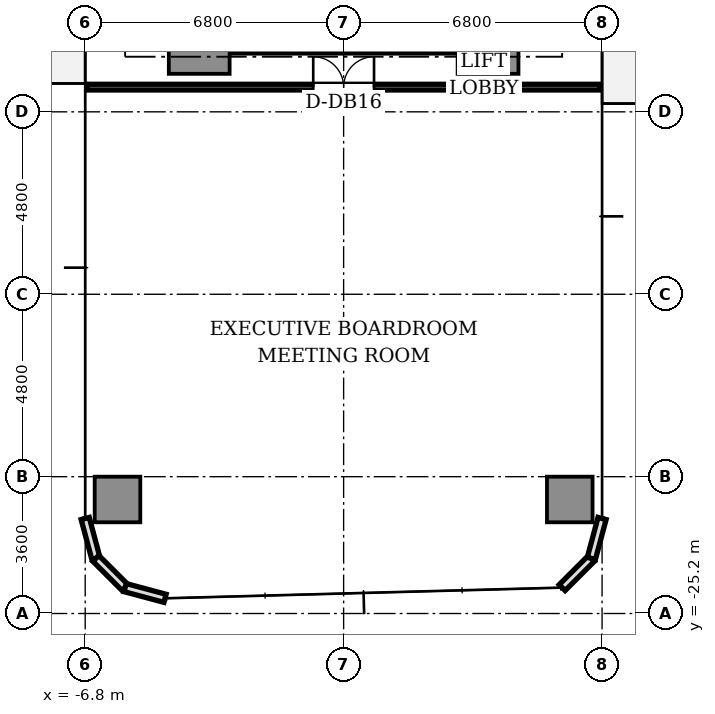
"""IFC4 building model, lengths in metres.
Left out: names, types, materials, properties, quantities, classifications, styles, units other than length and angle.
Written with IfcOpenShell. Run it as: python <this file> out.ifc"""

import sys

from ifc_helpers import new_model, si_unit, direction, frame, frame_2d, origin, origin_2d, place, context, subcontext, project, spatial, rectangle, extrude, source, transform, mapped, element, fill, save


model = new_model("IFC4")
c1 = context("Model", 3, precision=1e-05, world=origin(), true_north=direction((0.0, 1.0)))
c2 = subcontext(c1, "Body", "Model", "MODEL_VIEW")
j1 = project(units=[si_unit("LENGTHUNIT", "METRE"), si_unit("PLANEANGLEUNIT", "RADIAN")], contexts=[c1])
p1 = place(None, origin())
s1 = spatial("IfcSite", under=j1, at=p1, CompositionType="ELEMENT")
p2 = place(p1, origin())
s2 = spatial("IfcBuilding", under=s1, at=p2, CompositionType="ELEMENT")
p3 = place(p2, frame((0.0, 0.0, 71.15)))
s3 = spatial("IfcBuildingStorey", under=s2, at=p3, CompositionType="ELEMENT", Elevation=71.15)
p4 = place(p3, frame((-3.55, -10.2, 0.0), z_axis=(0.0, 0.0, 1.0), x_axis=(1.0, 0.0, 0.0)))
e1 = element("IfcWall", 1, at=p4, inside=s3, PredefinedType="SHEAR", context=c2, shape_type="SweptSolid", body=[
    extrude(rectangle(XDim=7.1, YDim=0.5, at=frame_2d((3.55, 0.0))), origin(), (0.0, 0.0, 1.0), 3.03),
])
m1 = source(origin(), c2, "Body", "SweptSolid", [
    extrude(rectangle(XDim=1.6, YDim=1.6, at=origin_2d()), origin(), (0.0, 0.0, 1.0), 3.03),
])
for number, where, z_axis, x_axis in (
    (2, (-3.8, -10.2, 0.0), (0.0, 0.0, 1.0), (1.0, 0.0, 0.0)),
    (3, (3.8, -10.2, 0.0), (0.0, 0.0, 1.0), (1.0, 0.0, 0.0)),
):
    element("IfcColumn", number, at=place(p3, frame(where, z_axis=z_axis, x_axis=x_axis)), inside=s3, PredefinedType="COLUMN", context=c2, shape_type="MappedRepresentation", body=[
        mapped(m1, transform((0.0, 0.0, 0.0), scale=1.0)),
    ])
m2 = source(origin(), c2, "Body", "SweptSolid", [
    extrude(rectangle(XDim=1.2, YDim=1.2, at=origin_2d()), origin(), (0.0, 0.0, 1.0), 3.03),
])
for number, where, z_axis, x_axis in (
    (4, (-5.95, -22.2, 0.0), (0.0, 0.0, 1.0), (1.0, 0.0, 0.0)),
    (5, (5.95, -22.2, 0.0), (0.0, 0.0, 1.0), (1.0, 0.0, 0.0)),
):
    element("IfcColumn", number, at=place(p3, frame(where, z_axis=z_axis, x_axis=x_axis)), inside=s3, PredefinedType="COLUMN", context=c2, shape_type="MappedRepresentation", body=[
        mapped(m2, transform((0.0, 0.0, 0.0), scale=1.0)),
    ])
for number, where, z_axis, x_axis in (
    (6, (-6.8, -22.7, 0.0), (0.0, 0.0, 1.0), (0.259, -0.966, 0.0)),
    (7, (-6.519, -23.75, 0.0), (0.0, 0.0, 1.0), (0.707, -0.707, 0.0)),
    (8, (-5.75, -24.519, 0.0), (0.0, 0.0, 1.0), (0.966, -0.259, 0.0)),
    (9, (5.75, -24.519, 0.0), (0.0, 0.0, 1.0), (0.707, 0.707, 0.0)),
    (10, (6.519, -23.75, 0.0), (0.0, 0.0, 1.0), (0.259, 0.966, 0.0)),
):
    element("IfcWall", number, at=place(p3, frame(where, z_axis=z_axis, x_axis=x_axis)), inside=s3, PredefinedType="STANDARD", context=c2, shape_type="SweptSolid", body=[
        extrude(rectangle(XDim=1.087, YDim=0.22, at=frame_2d((0.543, 0.0))), origin(), (0.0, 0.0, 1.0), 3.03),
    ])
p5 = place(p3, frame((-6.75, -11.35, 0.0), z_axis=(0.0, 0.0, 1.0), x_axis=(1.0, 0.0, 0.0)))
e11 = element("IfcWall", 11, at=p5, inside=s3, PredefinedType="PARTITIONING", context=c2, shape_type="SweptSolid", body=[
    extrude(rectangle(XDim=13.5, YDim=0.15, at=frame_2d((6.75, 0.0))), origin(), (0.0, 0.0, 1.0), 2.58),
])
p6 = place(p5, frame((5.95, 0.0, 0.0)))
e12 = element("IfcOpeningElement", 12, at=p6, cuts=e11, PredefinedType="OPENING", context=c2, shape_type="SweptSolid", body=[
    extrude(rectangle(XDim=1.6, YDim=2.25, at=frame_2d((0.8, 1.125))), frame((0.0, 0.085, 0.0), z_axis=(0.0, -1.0, 0.0), x_axis=(1.0, 0.0, 0.0)), (0.0, 0.0, 1.0), 0.17),
])
m3 = source(origin(), c2, "Body", "SweptSolid", [
    extrude(rectangle(XDim=1.6, YDim=0.05, at=origin_2d()), origin(), (0.0, 0.0, 1.0), 2.25),
])
p7 = place(p6, frame((0.8, 0.0, 0.0)))
e13 = element("IfcDoor", 13, at=p7, inside=s3, OperationType="DOUBLE_DOOR_SINGLE_SWING", PredefinedType="DOOR", context=c2, shape_type="MappedRepresentation", body=[
    mapped(m3, transform((0.0, 0.0, 0.0), scale=1.0)),
])
fill(e12, e13)
save(model, sys.argv[1])
